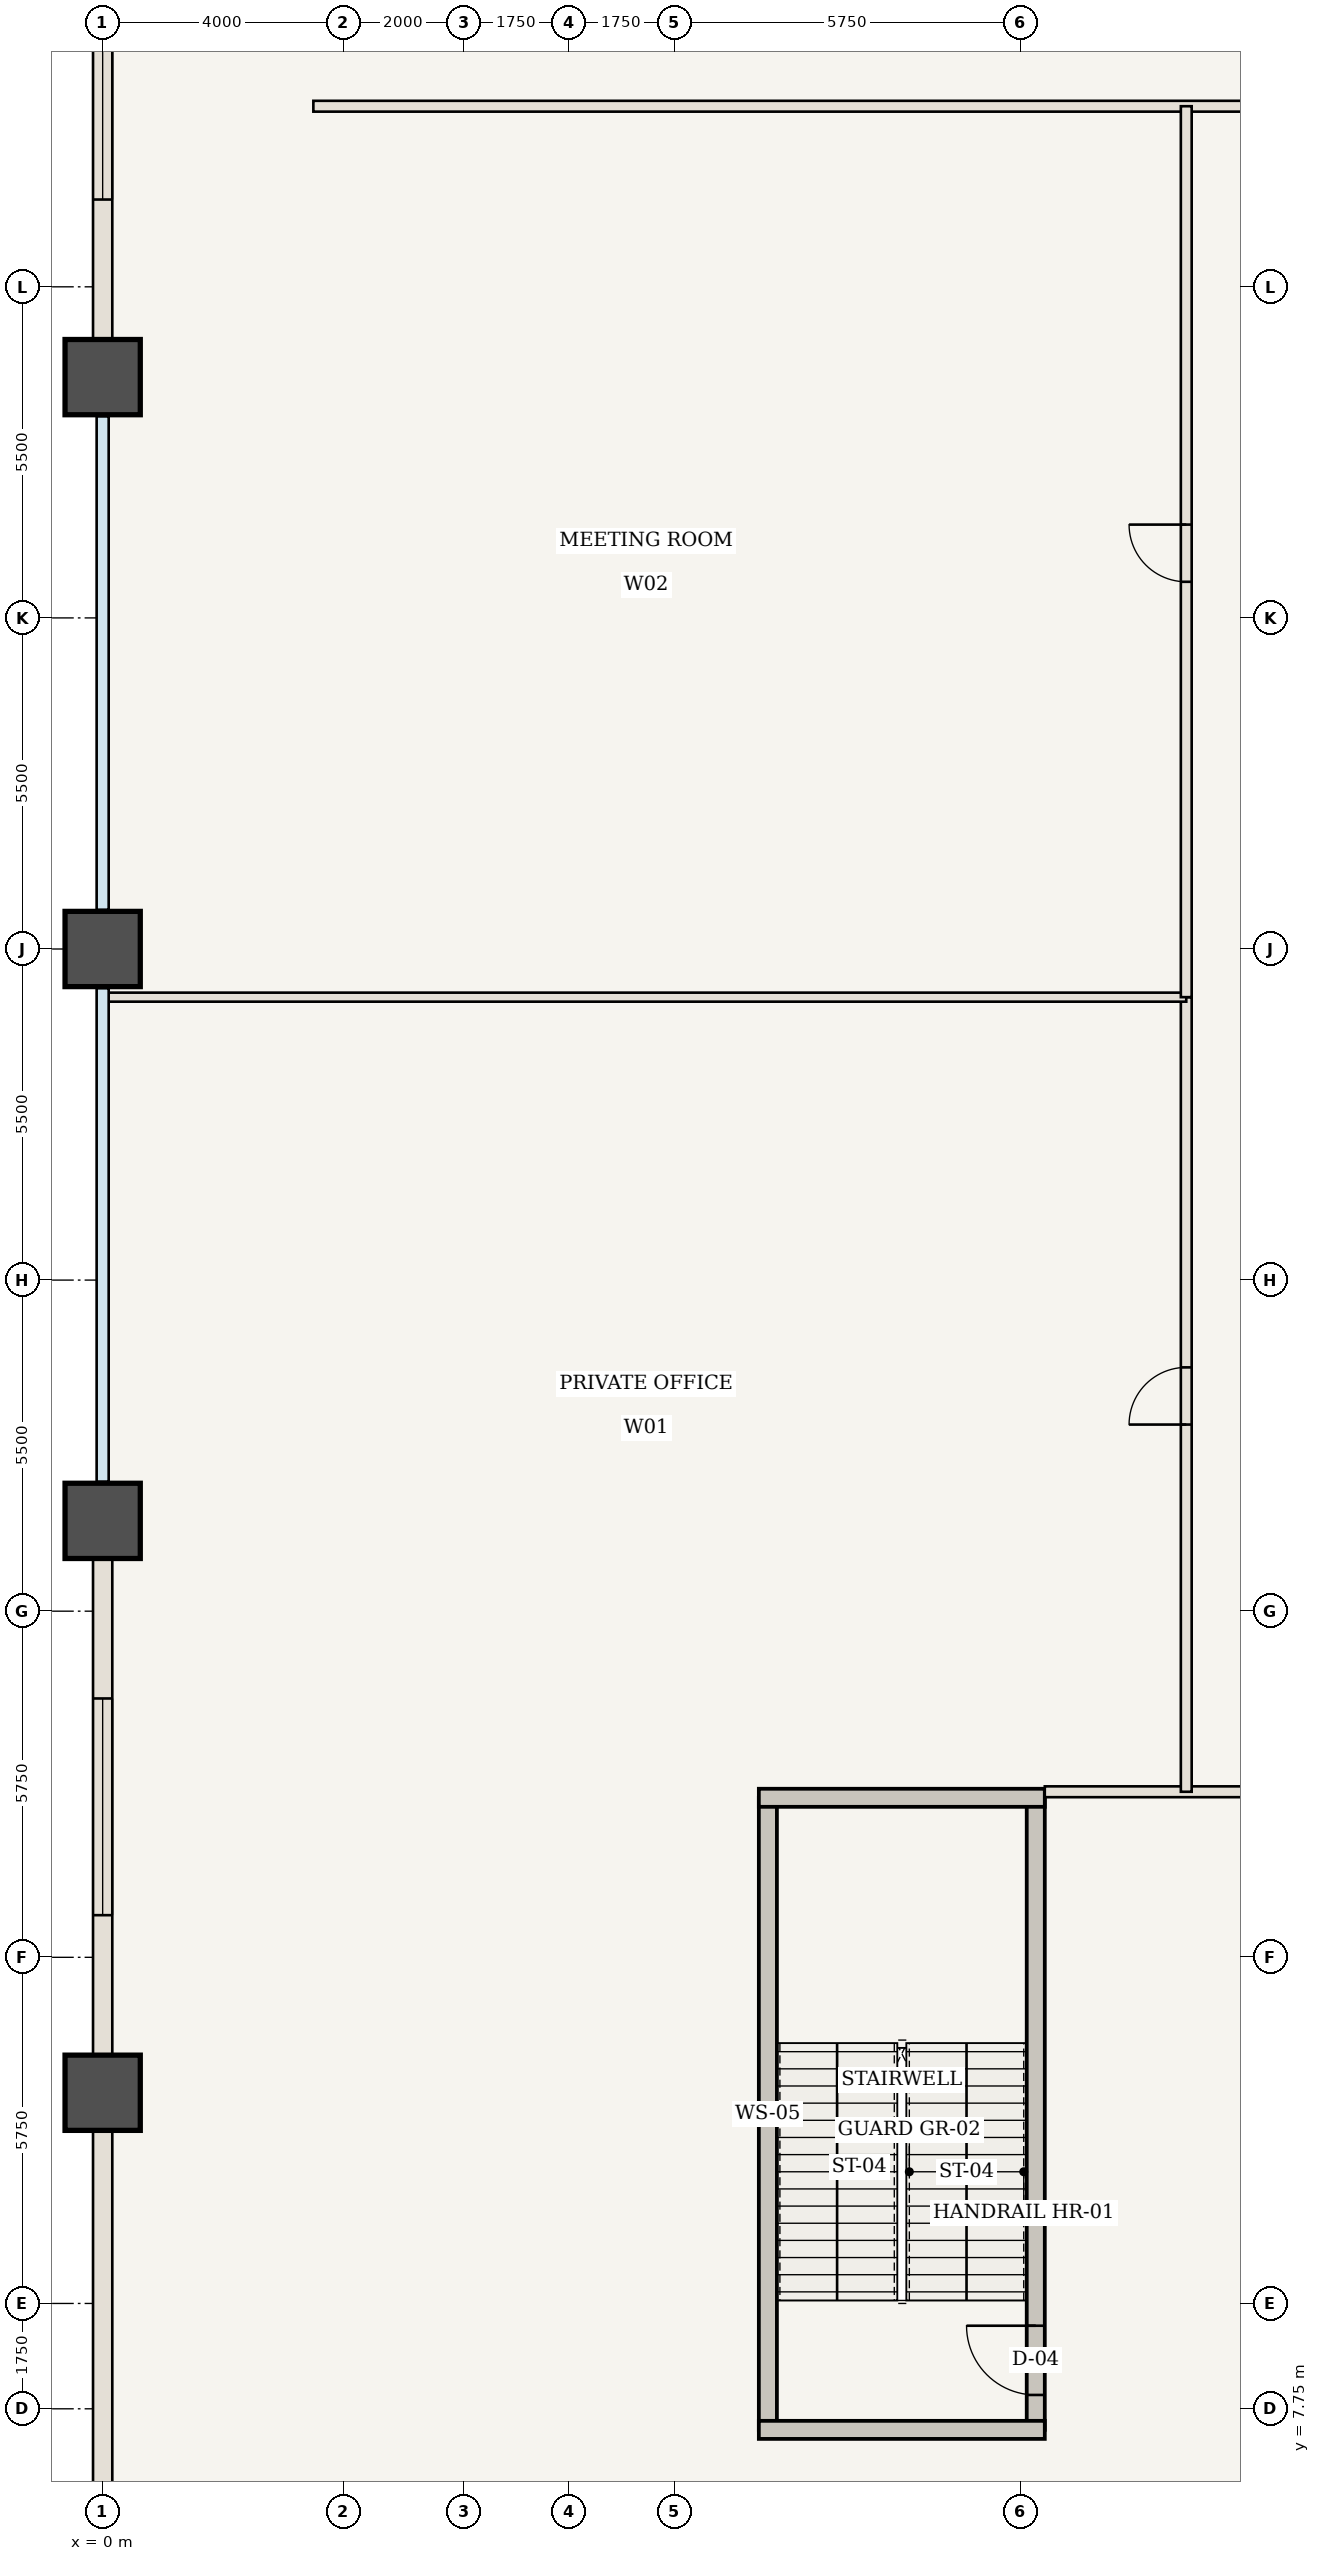
"""IFC4 building model, lengths in metres.
Left out: names, types, materials, properties, quantities, classifications, styles, units other than length and angle.
Written with IfcOpenShell. Run it as: python <this file> out.ifc"""

import sys

from ifc_helpers import new_model, si_unit, direction, frame, frame_2d, origin, origin_2d, place, context, subcontext, project, spatial, rectangle, extrude, element, fill, save


model = new_model("IFC4")
c1 = context("Model", 3, precision=1e-05, world=origin(), true_north=direction((0.0, 1.0)))
c2 = subcontext(c1, "Body", "Model", "MODEL_VIEW")
j1 = project(units=[si_unit("LENGTHUNIT", "METRE"), si_unit("PLANEANGLEUNIT", "RADIAN")], contexts=[c1])
p1 = place(None, origin())
s1 = spatial("IfcSite", under=j1, at=p1, CompositionType="ELEMENT")
p2 = place(p1, origin())
s2 = spatial("IfcBuilding", under=s1, at=p2, CompositionType="ELEMENT")
p3 = place(p2, frame((0.0, 0.0, 12.25)))
s3 = spatial("IfcBuildingStorey", under=s2, at=p3, CompositionType="ELEMENT", Elevation=12.25)
for number, where, z_axis, x_axis in (
    (1, (0.0, 13.0, 0.0), (0.0, 0.0, 1.0), (1.0, 0.0, 0.0)),
    (2, (0.0, 22.5, 0.0), (0.0, 0.0, 1.0), (1.0, 0.0, 0.0)),
    (3, (0.0, 32.0, 0.0), (0.0, 0.0, 1.0), (1.0, 0.0, 0.0)),
    (4, (0.0, 41.5, 0.0), (0.0, 0.0, 1.0), (1.0, 0.0, 0.0)),
):
    element("IfcColumn", number, at=place(p3, frame(where, z_axis=z_axis, x_axis=x_axis)), inside=s3, PredefinedType="COLUMN", context=c2, shape_type="SweptSolid", body=[
        extrude(rectangle(XDim=1.25, YDim=1.25, at=origin_2d()), origin(), (0.0, 0.0, 1.0), 5.6),
    ])
p4 = place(p3, frame((11.05, 7.4, 0.0), z_axis=(0.0, 0.0, 1.0), x_axis=(0.0, 1.0, 0.0)))
e5 = element("IfcWall", 5, at=p4, inside=s3, PredefinedType="SHEAR", context=c2, shape_type="SweptSolid", body=[
    extrude(rectangle(XDim=10.5, YDim=0.3, at=frame_2d((5.25, 0.0))), origin(), (0.0, 0.0, 1.0), 5.36),
])
p5 = place(p3, frame((15.5, 7.4, 0.0), z_axis=(0.0, 0.0, 1.0), x_axis=(0.0, 1.0, 0.0)))
e6 = element("IfcWall", 6, at=p5, inside=s3, PredefinedType="SHEAR", context=c2, shape_type="SweptSolid", body=[
    extrude(rectangle(XDim=10.5, YDim=0.3, at=frame_2d((5.25, 0.0))), origin(), (0.0, 0.0, 1.0), 5.36),
])
p6 = place(p5, frame((0.58, 0.0, 0.0)))
e7 = element("IfcOpeningElement", 7, at=p6, cuts=e6, PredefinedType="OPENING", context=c2, shape_type="SweptSolid", body=[
    extrude(rectangle(XDim=1.15, YDim=2.15, at=frame_2d((0.575, 1.075))), frame((0.0, 0.16, 0.0), z_axis=(0.0, -1.0, 0.0), x_axis=(1.0, 0.0, 0.0)), (0.0, 0.0, 1.0), 0.32),
])
for number, where, z_axis, x_axis in (
    (8, (10.9, 7.4, 0.0), (0.0, 0.0, 1.0), (1.0, 0.0, 0.0)),
    (9, (10.9, 17.9, 0.0), (0.0, 0.0, 1.0), (1.0, 0.0, 0.0)),
):
    element("IfcWall", number, at=place(p3, frame(where, z_axis=z_axis, x_axis=x_axis)), inside=s3, PredefinedType="SHEAR", context=c2, shape_type="SweptSolid", body=[
        extrude(rectangle(XDim=4.75, YDim=0.3, at=frame_2d((2.375, 0.0))), origin(), (0.0, 0.0, 1.0), 5.36),
    ])
p7 = place(p3, frame((15.65, 18.0, 0.0), z_axis=(0.0, 0.0, 1.0), x_axis=(1.0, 0.0, 0.0)))
e10 = element("IfcWall", 10, at=p7, inside=s3, PredefinedType="STANDARD", context=c2, shape_type="SweptSolid", body=[
    extrude(rectangle(XDim=25.35, YDim=0.18, at=frame_2d((12.675, 0.0))), origin(), (0.0, 0.0, 1.0), 5.36),
])
p8 = place(p7, frame((14.825, 0.0, 0.0)))
e11 = element("IfcOpeningElement", 11, at=p8, cuts=e10, PredefinedType="OPENING", context=c2, shape_type="SweptSolid", body=[
    extrude(rectangle(XDim=1.8, YDim=2.35, at=frame_2d((0.9, 1.175))), frame((0.0, 0.1, 0.0), z_axis=(0.0, -1.0, 0.0), x_axis=(1.0, 0.0, 0.0)), (0.0, 0.0, 1.0), 0.2),
])
p9 = place(p3, frame((3.5, 46.0, 0.0), z_axis=(0.0, 0.0, 1.0), x_axis=(1.0, 0.0, 0.0)))
e12 = element("IfcWall", 12, at=p9, inside=s3, PredefinedType="STANDARD", context=c2, shape_type="SweptSolid", body=[
    extrude(rectangle(XDim=21.5, YDim=0.18, at=frame_2d((10.75, 0.0))), origin(), (0.0, 0.0, 1.0), 5.36),
])
p10 = place(p9, frame((18.975, 0.0, 0.0)))
e13 = element("IfcOpeningElement", 13, at=p10, cuts=e12, PredefinedType="OPENING", context=c2, shape_type="SweptSolid", body=[
    extrude(rectangle(XDim=0.95, YDim=2.15, at=frame_2d((0.475, 1.075))), frame((0.0, 0.1, 0.0), z_axis=(0.0, -1.0, 0.0), x_axis=(1.0, 0.0, 0.0)), (0.0, 0.0, 1.0), 0.2),
])
p11 = place(p3, frame((18.0, 18.0, 0.0), z_axis=(0.0, 0.0, 1.0), x_axis=(0.0, 1.0, 0.0)))
e14 = element("IfcWall", 14, at=p11, inside=s3, PredefinedType="STANDARD", context=c2, shape_type="SweptSolid", body=[
    extrude(rectangle(XDim=13.2, YDim=0.18, at=frame_2d((6.6, 0.0))), origin(), (0.0, 0.0, 1.0), 5.36),
])
p12 = place(p11, frame((6.1, 0.0, 0.0)))
e15 = element("IfcOpeningElement", 15, at=p12, cuts=e14, PredefinedType="OPENING", context=c2, shape_type="SweptSolid", body=[
    extrude(rectangle(XDim=0.95, YDim=2.15, at=frame_2d((0.475, 1.075))), frame((0.0, 0.1, 0.0), z_axis=(0.0, -1.0, 0.0), x_axis=(1.0, 0.0, 0.0)), (0.0, 0.0, 1.0), 0.2),
])
p13 = place(p3, frame((0.06, 31.2, 0.0), z_axis=(0.0, 0.0, 1.0), x_axis=(1.0, 0.0, 0.0)))
e16 = element("IfcWall", 16, at=p13, inside=s3, PredefinedType="STANDARD", context=c2, shape_type="SweptSolid", body=[
    extrude(rectangle(XDim=17.94, YDim=0.15, at=frame_2d((8.97, 0.0))), origin(), (0.0, 0.0, 1.0), 5.36),
])
p14 = place(p3, frame((18.0, 31.2, 0.0), z_axis=(0.0, 0.0, 1.0), x_axis=(0.0, 1.0, 0.0)))
e17 = element("IfcWall", 17, at=p14, inside=s3, PredefinedType="STANDARD", context=c2, shape_type="SweptSolid", body=[
    extrude(rectangle(XDim=14.8, YDim=0.18, at=frame_2d((7.4, 0.0))), origin(), (0.0, 0.0, 1.0), 5.36),
])
p15 = place(p14, frame((6.9, 0.0, 0.0)))
e18 = element("IfcOpeningElement", 18, at=p15, cuts=e17, PredefinedType="OPENING", context=c2, shape_type="SweptSolid", body=[
    extrude(rectangle(XDim=0.95, YDim=2.15, at=frame_2d((0.475, 1.075))), frame((0.0, 0.1, 0.0), z_axis=(0.0, -1.0, 0.0), x_axis=(1.0, 0.0, 0.0)), (0.0, 0.0, 1.0), 0.2),
])
p16 = place(p3, frame((0.0, 3.5, 0.0), z_axis=(0.0, 0.0, 1.0), x_axis=(0.0, 1.0, 0.0)))
e19 = element("IfcWall", 19, at=p16, inside=s3, PredefinedType="USERDEFINED", context=c2, shape_type="SweptSolid", body=[
    extrude(rectangle(XDim=9.5, YDim=0.32, at=frame_2d((4.75, 0.0))), origin(), (0.0, 0.0, 1.0), 4.46),
])
p17 = place(p3, frame((0.0, 13.0, 0.0), z_axis=(0.0, 0.0, 1.0), x_axis=(0.0, 1.0, 0.0)))
e20 = element("IfcWall", 20, at=p17, inside=s3, PredefinedType="USERDEFINED", context=c2, shape_type="SweptSolid", body=[
    extrude(rectangle(XDim=9.5, YDim=0.32, at=frame_2d((4.75, 0.0))), origin(), (0.0, 0.0, 1.0), 4.46),
])
p18 = place(p17, frame((2.95, 0.0, 0.85)))
e21 = element("IfcOpeningElement", 21, at=p18, cuts=e20, PredefinedType="OPENING", context=c2, shape_type="SweptSolid", body=[
    extrude(rectangle(XDim=3.6, YDim=2.6, at=frame_2d((1.8, 1.3))), frame((0.0, 0.17, 0.0), z_axis=(0.0, -1.0, 0.0), x_axis=(1.0, 0.0, 0.0)), (0.0, 0.0, 1.0), 0.34),
])
p19 = place(p3, frame((0.0, 41.5, 0.0), z_axis=(0.0, 0.0, 1.0), x_axis=(0.0, 1.0, 0.0)))
e22 = element("IfcWall", 22, at=p19, inside=s3, PredefinedType="USERDEFINED", context=c2, shape_type="SweptSolid", body=[
    extrude(rectangle(XDim=9.5, YDim=0.32, at=frame_2d((4.75, 0.0))), origin(), (0.0, 0.0, 1.0), 4.46),
])
p20 = place(p19, frame((2.95, 0.0, 0.85)))
e23 = element("IfcOpeningElement", 23, at=p20, cuts=e22, PredefinedType="OPENING", context=c2, shape_type="SweptSolid", body=[
    extrude(rectangle(XDim=3.6, YDim=2.6, at=frame_2d((1.8, 1.3))), frame((0.0, 0.17, 0.0), z_axis=(0.0, -1.0, 0.0), x_axis=(1.0, 0.0, 0.0)), (0.0, 0.0, 1.0), 0.34),
])
p21 = place(p6, origin())
e24 = element("IfcDoor", 24, at=p21, inside=s3, OperationType="SINGLE_SWING_RIGHT", PredefinedType="DOOR", context=c2, shape_type="SweptSolid", body=[
    extrude(rectangle(XDim=1.15, YDim=2.15, at=frame_2d((0.575, 1.075))), frame((0.0, 0.025, 0.0), z_axis=(0.0, -1.0, 0.0), x_axis=(1.0, 0.0, 0.0)), (0.0, 0.0, 1.0), 0.05),
])
fill(e7, e24)
p22 = place(p12, origin())
e25 = element("IfcDoor", 25, at=p22, inside=s3, OperationType="SINGLE_SWING_LEFT", PredefinedType="DOOR", context=c2, shape_type="SweptSolid", body=[
    extrude(rectangle(XDim=0.95, YDim=2.15, at=frame_2d((0.475, 1.075))), frame((0.0, 0.025, 0.0), z_axis=(0.0, -1.0, 0.0), x_axis=(1.0, 0.0, 0.0)), (0.0, 0.0, 1.0), 0.05),
])
fill(e15, e25)
p23 = place(p15, origin())
e26 = element("IfcDoor", 26, at=p23, inside=s3, OperationType="SINGLE_SWING_RIGHT", PredefinedType="DOOR", context=c2, shape_type="SweptSolid", body=[
    extrude(rectangle(XDim=0.95, YDim=2.15, at=frame_2d((0.475, 1.075))), frame((0.0, 0.025, 0.0), z_axis=(0.0, -1.0, 0.0), x_axis=(1.0, 0.0, 0.0)), (0.0, 0.0, 1.0), 0.05),
])
fill(e18, e26)
p24 = place(p18, origin())
e27 = element("IfcWindow", 27, at=p24, inside=s3, PartitioningType="SINGLE_PANEL", PredefinedType="WINDOW", context=c2, shape_type="SweptSolid", body=[
    extrude(rectangle(XDim=3.6, YDim=2.6, at=frame_2d((1.8, 1.3))), frame((0.0, 0.03, 0.0), z_axis=(0.0, -1.0, 0.0), x_axis=(1.0, 0.0, 0.0)), (0.0, 0.0, 1.0), 0.06),
])
fill(e21, e27)
p25 = place(p20, origin())
e28 = element("IfcWindow", 28, at=p25, inside=s3, PartitioningType="SINGLE_PANEL", PredefinedType="WINDOW", context=c2, shape_type="SweptSolid", body=[
    extrude(rectangle(XDim=3.6, YDim=2.6, at=frame_2d((1.8, 1.3))), frame((0.0, 0.03, 0.0), z_axis=(0.0, -1.0, 0.0), x_axis=(1.0, 0.0, 0.0)), (0.0, 0.0, 1.0), 0.06),
])
fill(e23, e28)
save(model, sys.argv[1])
